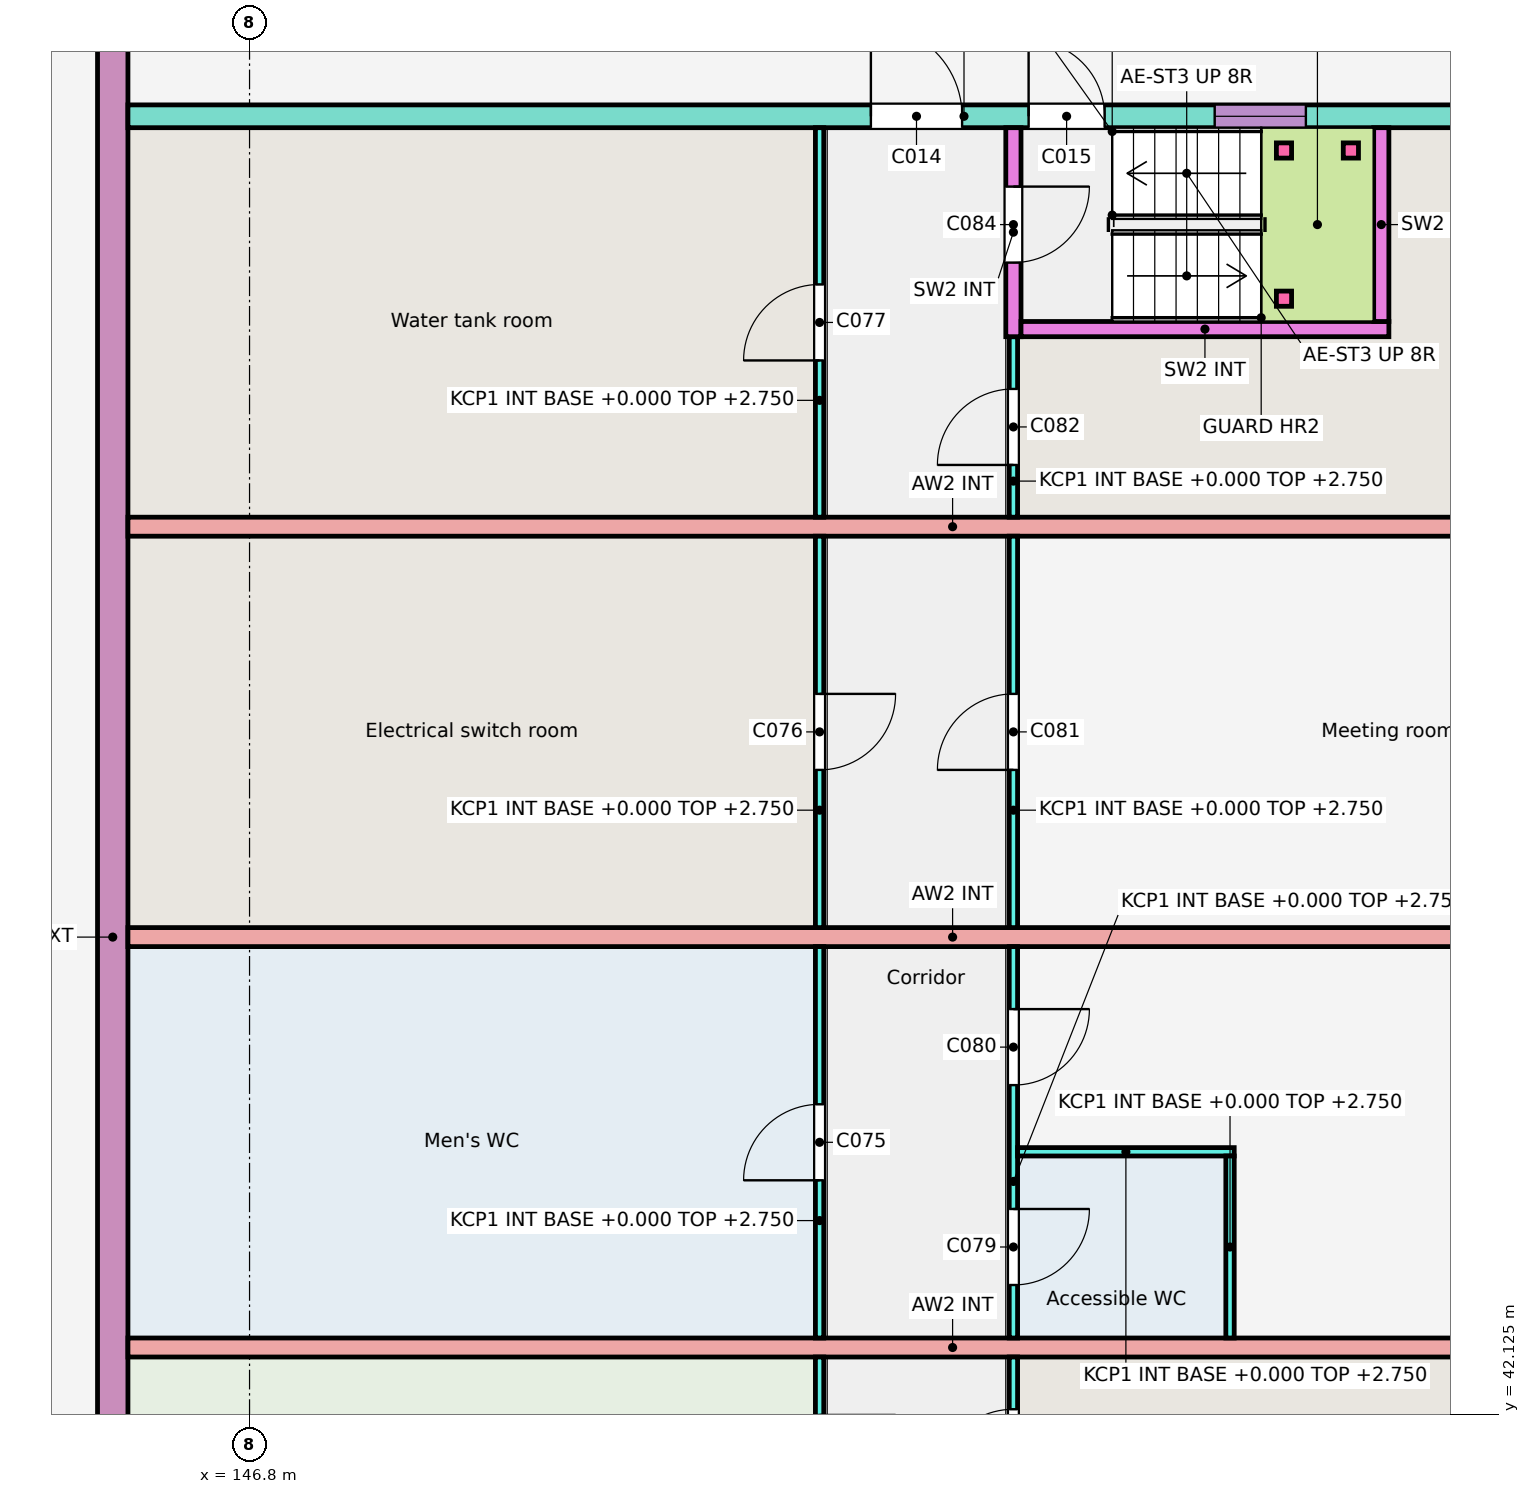
"""IFC4 building model, lengths in metres.
Left out: names, types, materials, properties, quantities, classifications, styles, units other than length and angle.
Written with IfcOpenShell. Run it as: python <this file> out.ifc"""

import sys

from ifc_helpers import new_model, si_unit, direction, frame, frame_2d, origin, origin_2d, place, context, subcontext, project, spatial, rectangle, extrude, element, fill, save


model = new_model("IFC4")
c1 = context("Model", 3, precision=1e-05, world=origin(), true_north=direction((0.0, 1.0)))
c2 = subcontext(c1, "Body", "Model", "MODEL_VIEW")
j1 = project(units=[si_unit("LENGTHUNIT", "METRE"), si_unit("PLANEANGLEUNIT", "RADIAN")], contexts=[c1])
p1 = place(None, origin())
s1 = spatial("IfcSite", under=j1, at=p1, CompositionType="ELEMENT")
p2 = place(p1, origin())
s2 = spatial("IfcBuilding", under=s1, at=p2, CompositionType="ELEMENT")
p3 = place(p2, origin())
s3 = spatial("IfcBuildingStorey", under=s2, at=p3, CompositionType="ELEMENT", Elevation=0.0)
p4 = place(p3, frame((145.0, 32.0, -0.25), z_axis=(0.0, 0.0, 1.0), x_axis=(0.0, 1.0, 0.0)))
e1 = element("IfcWall", 1, at=p4, inside=s3, PredefinedType="SOLIDWALL", context=c2, shape_type="SweptSolid", body=[
    extrude(rectangle(XDim=32.8, YDim=0.4, at=frame_2d((16.4, 0.0))), origin(), (0.0, 0.0, 1.0), 3.25),
])
p5 = place(p4, frame((2.2, 0.0, 0.25)))
e2 = element("IfcOpeningElement", 2, at=p5, cuts=e1, PredefinedType="OPENING", context=c2, shape_type="SweptSolid", body=[
    extrude(rectangle(XDim=1.8, YDim=2.1, at=frame_2d((0.9, 1.05))), frame((0.0, 0.21, 0.0), z_axis=(0.0, -1.0, 0.0), x_axis=(1.0, 0.0, 0.0)), (0.0, 0.0, 1.0), 0.42),
])
p6 = place(p4, frame((29.0, 0.0, 0.25)))
e3 = element("IfcOpeningElement", 3, at=p6, cuts=e1, PredefinedType="OPENING", context=c2, shape_type="SweptSolid", body=[
    extrude(rectangle(XDim=1.8, YDim=2.1, at=frame_2d((0.9, 1.05))), frame((0.0, 0.21, 0.0), z_axis=(0.0, -1.0, 0.0), x_axis=(1.0, 0.0, 0.0)), (0.0, 0.0, 1.0), 0.42),
])
p7 = place(p3, frame((145.2, 59.2, -0.25), z_axis=(0.0, 0.0, 1.0), x_axis=(1.0, 0.0, 0.0)))
e4 = element("IfcWall", 4, at=p7, inside=s3, PredefinedType="SOLIDWALL", context=c2, shape_type="SweptSolid", body=[
    extrude(rectangle(XDim=22.0, YDim=0.3, at=frame_2d((11.0, 0.0))), origin(), (0.0, 0.0, 1.0), 3.25),
])
p8 = place(p7, frame((14.298, 0.0, 1.15)))
e5 = element("IfcOpeningElement", 5, at=p8, cuts=e4, PredefinedType="OPENING", context=c2, shape_type="SweptSolid", body=[
    extrude(rectangle(XDim=1.2, YDim=1.5, at=frame_2d((0.6, 0.75))), frame((0.0, 0.16, 0.0), z_axis=(0.0, -1.0, 0.0), x_axis=(1.0, 0.0, 0.0)), (0.0, 0.0, 1.0), 0.32),
])
p9 = place(p7, frame((9.775, 0.0, 0.25)))
e6 = element("IfcOpeningElement", 6, at=p9, cuts=e4, PredefinedType="OPENING", context=c2, shape_type="SweptSolid", body=[
    extrude(rectangle(XDim=1.2, YDim=2.1, at=frame_2d((0.6, 1.05))), frame((0.0, 0.16, 0.0), z_axis=(0.0, -1.0, 0.0), x_axis=(1.0, 0.0, 0.0)), (0.0, 0.0, 1.0), 0.32),
])
p10 = place(p7, frame((11.85, 0.0, 0.25)))
e7 = element("IfcOpeningElement", 7, at=p10, cuts=e4, PredefinedType="OPENING", context=c2, shape_type="SweptSolid", body=[
    extrude(rectangle(XDim=1.0, YDim=2.1, at=frame_2d((0.5, 1.05))), frame((0.0, 0.16, 0.0), z_axis=(0.0, -1.0, 0.0), x_axis=(1.0, 0.0, 0.0)), (0.0, 0.0, 1.0), 0.32),
])
for number, where, z_axis, x_axis in (
    (8, (145.2, 43.0, -0.25), (0.0, 0.0, 1.0), (1.0, 0.0, 0.0)),
    (9, (145.2, 48.4, -0.25), (0.0, 0.0, 1.0), (1.0, 0.0, 0.0)),
    (10, (145.2, 53.8, -0.25), (0.0, 0.0, 1.0), (1.0, 0.0, 0.0)),
):
    element("IfcWall", number, at=place(p3, frame(where, z_axis=z_axis, x_axis=x_axis)), inside=s3, PredefinedType="SOLIDWALL", context=c2, shape_type="SweptSolid", body=[
        extrude(rectangle(XDim=21.7, YDim=0.25, at=frame_2d((10.85, 0.0))), origin(), (0.0, 0.0, 1.0), 3.25),
    ])
for number, where, z_axis, x_axis in (
    (11, (160.41, 56.8, 0.0), (0.0, 0.0, 1.0), (1.0, 0.0, 0.0)),
    (12, (160.41, 58.75, 0.0), (0.0, 0.0, 1.0), (1.0, 0.0, 0.0)),
    (13, (161.29, 58.75, 0.0), (0.0, 0.0, 1.0), (1.0, 0.0, 0.0)),
):
    element("IfcColumn", number, at=place(p3, frame(where, z_axis=z_axis, x_axis=x_axis)), inside=s3, PredefinedType="COLUMN", context=c2, shape_type="SweptSolid", body=[
        extrude(rectangle(XDim=0.2, YDim=0.2, at=origin_2d()), origin(), (0.0, 0.0, 1.0), 1.3),
    ])
p11 = place(p3, frame((154.3, 40.35, 0.0), z_axis=(0.0, 0.0, 1.0), x_axis=(0.0, 1.0, 0.0)))
e14 = element("IfcWall", 14, at=p11, inside=s3, PredefinedType="PARTITIONING", context=c2, shape_type="SweptSolid", body=[
    extrude(rectangle(XDim=2.525, YDim=0.11, at=frame_2d((1.262, 0.0))), origin(), (0.0, 0.0, 1.0), 2.75),
])
p12 = place(p11, frame((0.762, 0.0, 0.0)))
e15 = element("IfcOpeningElement", 15, at=p12, cuts=e14, PredefinedType="OPENING", context=c2, shape_type="SweptSolid", body=[
    extrude(rectangle(XDim=1.0, YDim=2.1, at=frame_2d((0.5, 1.05))), frame((0.0, 0.065, 0.0), z_axis=(0.0, -1.0, 0.0), x_axis=(1.0, 0.0, 0.0)), (0.0, 0.0, 1.0), 0.13),
])
p13 = place(p3, frame((154.3, 43.125, 0.0), z_axis=(0.0, 0.0, 1.0), x_axis=(0.0, 1.0, 0.0)))
e16 = element("IfcWall", 16, at=p13, inside=s3, PredefinedType="PARTITIONING", context=c2, shape_type="SweptSolid", body=[
    extrude(rectangle(XDim=5.15, YDim=0.11, at=frame_2d((2.575, 0.0))), origin(), (0.0, 0.0, 1.0), 2.75),
])
p14 = place(p13, frame((2.075, 0.0, 0.0)))
e17 = element("IfcOpeningElement", 17, at=p14, cuts=e16, PredefinedType="OPENING", context=c2, shape_type="SweptSolid", body=[
    extrude(rectangle(XDim=1.0, YDim=2.1, at=frame_2d((0.5, 1.05))), frame((0.0, 0.065, 0.0), z_axis=(0.0, -1.0, 0.0), x_axis=(1.0, 0.0, 0.0)), (0.0, 0.0, 1.0), 0.13),
])
p15 = place(p3, frame((154.3, 48.525, 0.0), z_axis=(0.0, 0.0, 1.0), x_axis=(0.0, 1.0, 0.0)))
e18 = element("IfcWall", 18, at=p15, inside=s3, PredefinedType="PARTITIONING", context=c2, shape_type="SweptSolid", body=[
    extrude(rectangle(XDim=5.15, YDim=0.11, at=frame_2d((2.575, 0.0))), origin(), (0.0, 0.0, 1.0), 2.75),
])
p16 = place(p15, frame((2.075, 0.0, 0.0)))
e19 = element("IfcOpeningElement", 19, at=p16, cuts=e18, PredefinedType="OPENING", context=c2, shape_type="SweptSolid", body=[
    extrude(rectangle(XDim=1.0, YDim=2.1, at=frame_2d((0.5, 1.05))), frame((0.0, 0.065, 0.0), z_axis=(0.0, -1.0, 0.0), x_axis=(1.0, 0.0, 0.0)), (0.0, 0.0, 1.0), 0.13),
])
p17 = place(p3, frame((154.3, 53.925, 0.0), z_axis=(0.0, 0.0, 1.0), x_axis=(0.0, 1.0, 0.0)))
e20 = element("IfcWall", 20, at=p17, inside=s3, PredefinedType="PARTITIONING", context=c2, shape_type="SweptSolid", body=[
    extrude(rectangle(XDim=5.125, YDim=0.11, at=frame_2d((2.562, 0.0))), origin(), (0.0, 0.0, 1.0), 2.75),
])
p18 = place(p17, frame((2.062, 0.0, 0.0)))
e21 = element("IfcOpeningElement", 21, at=p18, cuts=e20, PredefinedType="OPENING", context=c2, shape_type="SweptSolid", body=[
    extrude(rectangle(XDim=1.0, YDim=2.1, at=frame_2d((0.5, 1.05))), frame((0.0, 0.065, 0.0), z_axis=(0.0, -1.0, 0.0), x_axis=(1.0, 0.0, 0.0)), (0.0, 0.0, 1.0), 0.13),
])
p19 = place(p3, frame((156.85, 40.5, 0.0), z_axis=(0.0, 0.0, 1.0), x_axis=(0.0, 1.0, 0.0)))
e22 = element("IfcWall", 22, at=p19, inside=s3, PredefinedType="PARTITIONING", context=c2, shape_type="SweptSolid", body=[
    extrude(rectangle(XDim=2.375, YDim=0.11, at=frame_2d((1.188, 0.0))), origin(), (0.0, 0.0, 1.0), 2.75),
])
p20 = place(p19, frame((0.688, 0.0, 0.0)))
e23 = element("IfcOpeningElement", 23, at=p20, cuts=e22, PredefinedType="OPENING", context=c2, shape_type="SweptSolid", body=[
    extrude(rectangle(XDim=1.0, YDim=2.1, at=frame_2d((0.5, 1.05))), frame((0.0, 0.065, 0.0), z_axis=(0.0, -1.0, 0.0), x_axis=(1.0, 0.0, 0.0)), (0.0, 0.0, 1.0), 0.13),
])
p21 = place(p3, frame((156.85, 43.125, 0.0), z_axis=(0.0, 0.0, 1.0), x_axis=(0.0, 1.0, 0.0)))
e24 = element("IfcWall", 24, at=p21, inside=s3, PredefinedType="PARTITIONING", context=c2, shape_type="SweptSolid", body=[
    extrude(rectangle(XDim=5.15, YDim=0.11, at=frame_2d((2.575, 0.0))), origin(), (0.0, 0.0, 1.0), 2.75),
])
p22 = place(p21, frame((0.698, 0.0, 0.0)))
e25 = element("IfcOpeningElement", 25, at=p22, cuts=e24, PredefinedType="OPENING", context=c2, shape_type="SweptSolid", body=[
    extrude(rectangle(XDim=1.0, YDim=2.1, at=frame_2d((0.5, 1.05))), frame((0.0, 0.065, 0.0), z_axis=(0.0, -1.0, 0.0), x_axis=(1.0, 0.0, 0.0)), (0.0, 0.0, 1.0), 0.13),
])
p23 = place(p21, frame((3.327, 0.0, 0.0)))
e26 = element("IfcOpeningElement", 26, at=p23, cuts=e24, PredefinedType="OPENING", context=c2, shape_type="SweptSolid", body=[
    extrude(rectangle(XDim=1.0, YDim=2.1, at=frame_2d((0.5, 1.05))), frame((0.0, 0.065, 0.0), z_axis=(0.0, -1.0, 0.0), x_axis=(1.0, 0.0, 0.0)), (0.0, 0.0, 1.0), 0.13),
])
p24 = place(p3, frame((156.85, 48.525, 0.0), z_axis=(0.0, 0.0, 1.0), x_axis=(0.0, 1.0, 0.0)))
e27 = element("IfcWall", 27, at=p24, inside=s3, PredefinedType="PARTITIONING", context=c2, shape_type="SweptSolid", body=[
    extrude(rectangle(XDim=5.15, YDim=0.11, at=frame_2d((2.575, 0.0))), origin(), (0.0, 0.0, 1.0), 2.75),
])
p25 = place(p24, frame((2.075, 0.0, 0.0)))
e28 = element("IfcOpeningElement", 28, at=p25, cuts=e27, PredefinedType="OPENING", context=c2, shape_type="SweptSolid", body=[
    extrude(rectangle(XDim=1.0, YDim=2.1, at=frame_2d((0.5, 1.05))), frame((0.0, 0.065, 0.0), z_axis=(0.0, -1.0, 0.0), x_axis=(1.0, 0.0, 0.0)), (0.0, 0.0, 1.0), 0.13),
])
p26 = place(p3, frame((156.85, 53.925, 0.0), z_axis=(0.0, 0.0, 1.0), x_axis=(0.0, 1.0, 0.0)))
e29 = element("IfcWall", 29, at=p26, inside=s3, PredefinedType="PARTITIONING", context=c2, shape_type="SweptSolid", body=[
    extrude(rectangle(XDim=2.375, YDim=0.11, at=frame_2d((1.188, 0.0))), origin(), (0.0, 0.0, 1.0), 2.75),
])
p27 = place(p26, frame((0.688, 0.0, 0.0)))
e30 = element("IfcOpeningElement", 30, at=p27, cuts=e29, PredefinedType="OPENING", context=c2, shape_type="SweptSolid", body=[
    extrude(rectangle(XDim=1.0, YDim=2.1, at=frame_2d((0.5, 1.05))), frame((0.0, 0.065, 0.0), z_axis=(0.0, -1.0, 0.0), x_axis=(1.0, 0.0, 0.0)), (0.0, 0.0, 1.0), 0.13),
])
p28 = place(p3, frame((156.85, 56.3, 0.0), z_axis=(0.0, 0.0, 1.0), x_axis=(0.0, 1.0, 0.0)))
e31 = element("IfcWall", 31, at=p28, inside=s3, PredefinedType="SOLIDWALL", context=c2, shape_type="SweptSolid", body=[
    extrude(rectangle(XDim=2.75, YDim=0.2, at=frame_2d((1.375, 0.0))), origin(), (0.0, 0.0, 1.0), 2.75),
])
p29 = place(p28, frame((0.975, 0.0, 0.0)))
e32 = element("IfcOpeningElement", 32, at=p29, cuts=e31, PredefinedType="OPENING", context=c2, shape_type="SweptSolid", body=[
    extrude(rectangle(XDim=1.0, YDim=2.1, at=frame_2d((0.5, 1.05))), frame((0.0, 0.11, 0.0), z_axis=(0.0, -1.0, 0.0), x_axis=(1.0, 0.0, 0.0)), (0.0, 0.0, 1.0), 0.22),
])
p30 = place(p3, frame((156.95, 56.4, 0.0), z_axis=(0.0, 0.0, 1.0), x_axis=(1.0, 0.0, 0.0)))
e33 = element("IfcWall", 33, at=p30, inside=s3, PredefinedType="SOLIDWALL", context=c2, shape_type="SweptSolid", body=[
    extrude(rectangle(XDim=4.84, YDim=0.2, at=frame_2d((2.42, 0.0))), origin(), (0.0, 0.0, 1.0), 2.75),
])
p31 = place(p3, frame((161.69, 59.05, 0.0), z_axis=(0.0, 0.0, 1.0), x_axis=(0.0, -1.0, 0.0)))
e34 = element("IfcWall", 34, at=p31, inside=s3, PredefinedType="SOLIDWALL", context=c2, shape_type="SweptSolid", body=[
    extrude(rectangle(XDim=2.55, YDim=0.2, at=frame_2d((1.275, 0.0))), origin(), (0.0, 0.0, 1.0), 2.75),
])
p32 = place(p3, frame((156.905, 45.575, 0.0), z_axis=(0.0, 0.0, 1.0), x_axis=(1.0, 0.0, 0.0)))
e35 = element("IfcWall", 35, at=p32, inside=s3, PredefinedType="PARTITIONING", context=c2, shape_type="SweptSolid", body=[
    extrude(rectangle(XDim=2.85, YDim=0.11, at=frame_2d((1.425, 0.0))), origin(), (0.0, 0.0, 1.0), 2.75),
])
p33 = place(p3, frame((159.7, 43.125, 0.0), z_axis=(0.0, 0.0, 1.0), x_axis=(0.0, 1.0, 0.0)))
e36 = element("IfcWall", 36, at=p33, inside=s3, PredefinedType="PARTITIONING", context=c2, shape_type="SweptSolid", body=[
    extrude(rectangle(XDim=2.395, YDim=0.11, at=frame_2d((1.198, 0.0))), origin(), (0.0, 0.0, 1.0), 2.75),
])
p34 = place(p8, origin())
e37 = element("IfcWindow", 37, at=p34, inside=s3, PartitioningType="SINGLE_PANEL", PredefinedType="WINDOW", context=c2, shape_type="SweptSolid", body=[
    extrude(rectangle(XDim=1.2, YDim=1.5, at=frame_2d((0.6, 0.75))), frame((0.0, 0.03, 0.0), z_axis=(0.0, -1.0, 0.0), x_axis=(1.0, 0.0, 0.0)), (0.0, 0.0, 1.0), 0.06),
])
fill(e5, e37)
p35 = place(p9, origin())
e38 = element("IfcDoor", 38, at=p35, inside=s3, OperationType="SINGLE_SWING_LEFT", PredefinedType="DOOR", context=c2, shape_type="SweptSolid", body=[
    extrude(rectangle(XDim=1.2, YDim=2.1, at=frame_2d((0.6, 1.05))), frame((0.0, 0.025, 0.0), z_axis=(0.0, -1.0, 0.0), x_axis=(1.0, 0.0, 0.0)), (0.0, 0.0, 1.0), 0.05),
])
fill(e6, e38)
p36 = place(p10, origin())
e39 = element("IfcDoor", 39, at=p36, inside=s3, OperationType="SINGLE_SWING_LEFT", PredefinedType="DOOR", context=c2, shape_type="SweptSolid", body=[
    extrude(rectangle(XDim=1.0, YDim=2.1, at=frame_2d((0.5, 1.05))), frame((0.0, 0.025, 0.0), z_axis=(0.0, -1.0, 0.0), x_axis=(1.0, 0.0, 0.0)), (0.0, 0.0, 1.0), 0.05),
])
fill(e7, e39)
p37 = place(p14, origin())
e40 = element("IfcDoor", 40, at=p37, inside=s3, OperationType="SINGLE_SWING_LEFT", PredefinedType="DOOR", context=c2, shape_type="SweptSolid", body=[
    extrude(rectangle(XDim=1.0, YDim=2.1, at=frame_2d((0.5, 1.05))), frame((0.0, 0.025, 0.0), z_axis=(0.0, -1.0, 0.0), x_axis=(1.0, 0.0, 0.0)), (0.0, 0.0, 1.0), 0.05),
])
fill(e17, e40)
p38 = place(p16, origin())
e41 = element("IfcDoor", 41, at=p38, inside=s3, OperationType="SINGLE_SWING_RIGHT", PredefinedType="DOOR", context=c2, shape_type="SweptSolid", body=[
    extrude(rectangle(XDim=1.0, YDim=2.1, at=frame_2d((0.5, 1.05))), frame((0.0, 0.025, 0.0), z_axis=(0.0, -1.0, 0.0), x_axis=(1.0, 0.0, 0.0)), (0.0, 0.0, 1.0), 0.05),
])
fill(e19, e41)
p39 = place(p18, origin())
e42 = element("IfcDoor", 42, at=p39, inside=s3, OperationType="SINGLE_SWING_LEFT", PredefinedType="DOOR", context=c2, shape_type="SweptSolid", body=[
    extrude(rectangle(XDim=1.0, YDim=2.1, at=frame_2d((0.5, 1.05))), frame((0.0, 0.025, 0.0), z_axis=(0.0, -1.0, 0.0), x_axis=(1.0, 0.0, 0.0)), (0.0, 0.0, 1.0), 0.05),
])
fill(e21, e42)
p40 = place(p20, origin())
e43 = element("IfcDoor", 43, at=p40, inside=s3, OperationType="SINGLE_SWING_LEFT", PredefinedType="DOOR", context=c2, shape_type="SweptSolid", body=[
    extrude(rectangle(XDim=1.0, YDim=2.1, at=frame_2d((0.5, 1.05))), frame((0.0, 0.025, 0.0), z_axis=(0.0, -1.0, 0.0), x_axis=(1.0, 0.0, 0.0)), (0.0, 0.0, 1.0), 0.05),
])
fill(e23, e43)
p41 = place(p22, origin())
e44 = element("IfcDoor", 44, at=p41, inside=s3, OperationType="SINGLE_SWING_RIGHT", PredefinedType="DOOR", context=c2, shape_type="SweptSolid", body=[
    extrude(rectangle(XDim=1.0, YDim=2.1, at=frame_2d((0.5, 1.05))), frame((0.0, 0.025, 0.0), z_axis=(0.0, -1.0, 0.0), x_axis=(1.0, 0.0, 0.0)), (0.0, 0.0, 1.0), 0.05),
])
fill(e25, e44)
p42 = place(p23, origin())
e45 = element("IfcDoor", 45, at=p42, inside=s3, OperationType="SINGLE_SWING_RIGHT", PredefinedType="DOOR", context=c2, shape_type="SweptSolid", body=[
    extrude(rectangle(XDim=1.0, YDim=2.1, at=frame_2d((0.5, 1.05))), frame((0.0, 0.025, 0.0), z_axis=(0.0, -1.0, 0.0), x_axis=(1.0, 0.0, 0.0)), (0.0, 0.0, 1.0), 0.05),
])
fill(e26, e45)
p43 = place(p25, origin())
e46 = element("IfcDoor", 46, at=p43, inside=s3, OperationType="SINGLE_SWING_LEFT", PredefinedType="DOOR", context=c2, shape_type="SweptSolid", body=[
    extrude(rectangle(XDim=1.0, YDim=2.1, at=frame_2d((0.5, 1.05))), frame((0.0, 0.025, 0.0), z_axis=(0.0, -1.0, 0.0), x_axis=(1.0, 0.0, 0.0)), (0.0, 0.0, 1.0), 0.05),
])
fill(e28, e46)
p44 = place(p27, origin())
e47 = element("IfcDoor", 47, at=p44, inside=s3, OperationType="SINGLE_SWING_LEFT", PredefinedType="DOOR", context=c2, shape_type="SweptSolid", body=[
    extrude(rectangle(XDim=1.0, YDim=2.1, at=frame_2d((0.5, 1.05))), frame((0.0, 0.025, 0.0), z_axis=(0.0, -1.0, 0.0), x_axis=(1.0, 0.0, 0.0)), (0.0, 0.0, 1.0), 0.05),
])
fill(e30, e47)
p45 = place(p29, origin())
e48 = element("IfcDoor", 48, at=p45, inside=s3, OperationType="SINGLE_SWING_RIGHT", PredefinedType="DOOR", context=c2, shape_type="SweptSolid", body=[
    extrude(rectangle(XDim=1.0, YDim=2.1, at=frame_2d((0.5, 1.05))), frame((0.0, 0.025, 0.0), z_axis=(0.0, -1.0, 0.0), x_axis=(1.0, 0.0, 0.0)), (0.0, 0.0, 1.0), 0.05),
])
fill(e32, e48)
save(model, sys.argv[1])
